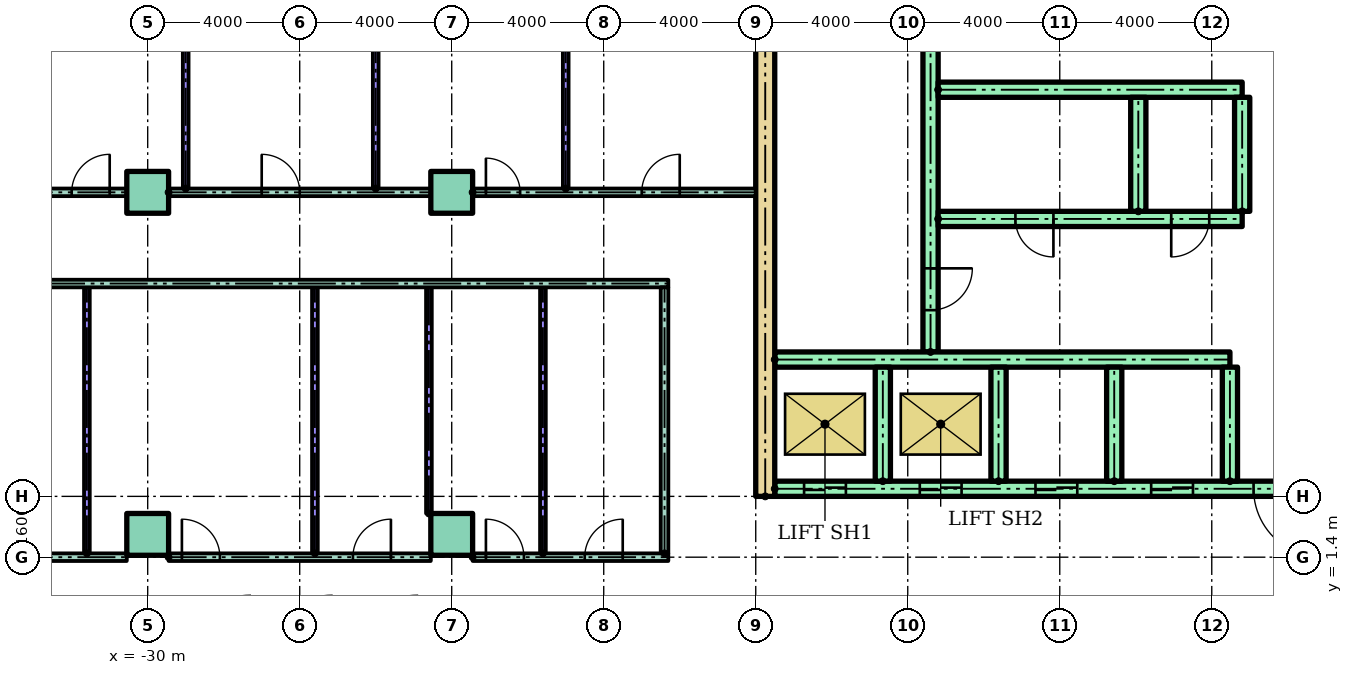
"""IFC4 building model, lengths in metres.
Left out: names, types, materials, properties, quantities, classifications, styles, units other than length and angle.
Written with IfcOpenShell. Run it as: python <this file> out.ifc"""

import sys

from ifc_helpers import new_model, si_unit, direction, frame, frame_2d, origin, origin_2d, place, context, subcontext, project, spatial, rectangle, extrude, element, fill, save


model = new_model("IFC4")
c1 = context("Model", 3, precision=1e-05, world=origin(), true_north=direction((0.0, 1.0)))
c2 = subcontext(c1, "Body", "Model", "MODEL_VIEW")
j1 = project(units=[si_unit("LENGTHUNIT", "METRE"), si_unit("PLANEANGLEUNIT", "RADIAN")], contexts=[c1])
p1 = place(None, origin())
s1 = spatial("IfcSite", under=j1, at=p1, CompositionType="ELEMENT")
p2 = place(p1, origin())
s2 = spatial("IfcBuilding", under=s1, at=p2, CompositionType="ELEMENT")
p3 = place(p2, origin())
s3 = spatial("IfcBuildingStorey", under=s2, at=p3, CompositionType="ELEMENT", Elevation=0.0)
for number, where in (
    (1, (-30.0, 2.0, 0.0)),
    (2, (-22.0, 2.0, 0.0)),
    (3, (-30.0, 11.0, 0.0)),
    (4, (-22.0, 11.0, 0.0)),
):
    element("IfcColumn", number, at=place(p3, frame(where)), inside=s3, PredefinedType="COLUMN", context=c2, shape_type="SweptSolid", body=[
        extrude(rectangle(XDim=1.1, YDim=1.1, at=origin_2d()), origin(), (0.0, 0.0, 1.0), 6.0),
    ])
p4 = place(p3, frame((-13.75, 3.0, 0.0), z_axis=(0.0, 0.0, 1.0), x_axis=(0.0, 1.0, 0.0)))
e5 = element("IfcWall", 5, at=p4, inside=s3, PredefinedType="SHEAR", context=c2, shape_type="SweptSolid", body=[
    extrude(rectangle(XDim=17.0, YDim=0.5, at=frame_2d((8.5, 0.0))), origin(), (0.0, 0.0, 1.0), 5.7),
])
p5 = place(p3, frame((-9.4, 6.8, 0.0), z_axis=(0.0, 0.0, 1.0), x_axis=(0.0, 1.0, 0.0)))
e6 = element("IfcWall", 6, at=p5, inside=s3, PredefinedType="SHEAR", context=c2, shape_type="SweptSolid", body=[
    extrude(rectangle(XDim=12.7, YDim=0.4, at=frame_2d((6.35, 0.0))), origin(), (0.0, 0.0, 1.0), 5.7),
])
p6 = place(p5, frame((1.1, 0.0, 0.0)))
e7 = element("IfcOpeningElement", 7, at=p6, cuts=e6, PredefinedType="OPENING", context=c2, shape_type="SweptSolid", body=[
    extrude(rectangle(XDim=1.1, YDim=2.1, at=frame_2d((0.55, 1.05))), frame((0.0, 0.21, 0.0), z_axis=(0.0, -1.0, 0.0), x_axis=(1.0, 0.0, 0.0)), (0.0, 0.0, 1.0), 0.42),
])
p7 = place(p3, frame((-13.5, 3.2, 0.0)))
e8 = element("IfcWall", 8, at=p7, inside=s3, PredefinedType="SHEAR", context=c2, shape_type="SweptSolid", body=[
    extrude(rectangle(XDim=27.0, YDim=0.4, at=frame_2d((13.5, 0.0))), origin(), (0.0, 0.0, 1.0), 5.7),
])
p8 = place(p7, frame((0.772, 0.0, 0.0)))
e9 = element("IfcOpeningElement", 9, at=p8, cuts=e8, PredefinedType="OPENING", context=c2, shape_type="SweptSolid", body=[
    extrude(rectangle(XDim=1.1, YDim=2.1, at=frame_2d((0.55, 1.05))), frame((0.0, 0.21, 0.0), z_axis=(0.0, -1.0, 0.0), x_axis=(1.0, 0.0, 0.0)), (0.0, 0.0, 1.0), 0.42),
])
p9 = place(p7, frame((3.817, 0.0, 0.0)))
e10 = element("IfcOpeningElement", 10, at=p9, cuts=e8, PredefinedType="OPENING", context=c2, shape_type="SweptSolid", body=[
    extrude(rectangle(XDim=1.1, YDim=2.1, at=frame_2d((0.55, 1.05))), frame((0.0, 0.21, 0.0), z_axis=(0.0, -1.0, 0.0), x_axis=(1.0, 0.0, 0.0)), (0.0, 0.0, 1.0), 0.42),
])
p10 = place(p7, frame((6.861, 0.0, 0.0)))
e11 = element("IfcOpeningElement", 11, at=p10, cuts=e8, PredefinedType="OPENING", context=c2, shape_type="SweptSolid", body=[
    extrude(rectangle(XDim=1.1, YDim=2.1, at=frame_2d((0.55, 1.05))), frame((0.0, 0.21, 0.0), z_axis=(0.0, -1.0, 0.0), x_axis=(1.0, 0.0, 0.0)), (0.0, 0.0, 1.0), 0.42),
])
p11 = place(p7, frame((9.906, 0.0, 0.0)))
e12 = element("IfcOpeningElement", 12, at=p11, cuts=e8, PredefinedType="OPENING", context=c2, shape_type="SweptSolid", body=[
    extrude(rectangle(XDim=1.1, YDim=2.1, at=frame_2d((0.55, 1.05))), frame((0.0, 0.21, 0.0), z_axis=(0.0, -1.0, 0.0), x_axis=(1.0, 0.0, 0.0)), (0.0, 0.0, 1.0), 0.42),
])
p12 = place(p7, frame((15.994, 0.0, 0.0)))
e13 = element("IfcOpeningElement", 13, at=p12, cuts=e8, PredefinedType="OPENING", context=c2, shape_type="SweptSolid", body=[
    extrude(rectangle(XDim=1.1, YDim=2.1, at=frame_2d((0.55, 1.05))), frame((0.0, 0.21, 0.0), z_axis=(0.0, -1.0, 0.0), x_axis=(1.0, 0.0, 0.0)), (0.0, 0.0, 1.0), 0.42),
])
p13 = place(p7, frame((19.039, 0.0, 0.0)))
e14 = element("IfcOpeningElement", 14, at=p13, cuts=e8, PredefinedType="OPENING", context=c2, shape_type="SweptSolid", body=[
    extrude(rectangle(XDim=1.1, YDim=2.1, at=frame_2d((0.55, 1.05))), frame((0.0, 0.21, 0.0), z_axis=(0.0, -1.0, 0.0), x_axis=(1.0, 0.0, 0.0)), (0.0, 0.0, 1.0), 0.42),
])
p14 = place(p7, frame((12.6, 0.0, 0.0)))
e15 = element("IfcOpeningElement", 15, at=p14, cuts=e8, PredefinedType="OPENING", context=c2, shape_type="SweptSolid", body=[
    extrude(rectangle(XDim=1.8, YDim=2.1, at=frame_2d((0.9, 1.05))), frame((0.0, 0.21, 0.0), z_axis=(0.0, -1.0, 0.0), x_axis=(1.0, 0.0, 0.0)), (0.0, 0.0, 1.0), 0.42),
])
p15 = place(p3, frame((-13.5, 6.6, 0.0)))
e16 = element("IfcWall", 16, at=p15, inside=s3, PredefinedType="SHEAR", context=c2, shape_type="SweptSolid", body=[
    extrude(rectangle(XDim=11.978, YDim=0.4, at=frame_2d((5.989, 0.0))), origin(), (0.0, 0.0, 1.0), 5.7),
])
for number, where, z_axis, x_axis in (
    (17, (-10.656, 3.4, 0.0), (0.0, 0.0, 1.0), (0.0, 1.0, 0.0)),
    (18, (-7.611, 3.4, 0.0), (0.0, 0.0, 1.0), (0.0, 1.0, 0.0)),
    (19, (-4.567, 3.4, 0.0), (0.0, 0.0, 1.0), (0.0, 1.0, 0.0)),
    (20, (-1.522, 3.4, 0.0), (0.0, 0.0, 1.0), (0.0, 1.0, 0.0)),
):
    element("IfcWall", number, at=place(p3, frame(where, z_axis=z_axis, x_axis=x_axis)), inside=s3, PredefinedType="SHEAR", context=c2, shape_type="SweptSolid", body=[
        extrude(rectangle(XDim=3.0, YDim=0.4, at=frame_2d((1.5, 0.0))), origin(), (0.0, 0.0, 1.0), 5.7),
    ])
p16 = place(p3, frame((-9.2, 10.3, 0.0)))
e21 = element("IfcWall", 21, at=p16, inside=s3, PredefinedType="SHEAR", context=c2, shape_type="SweptSolid", body=[
    extrude(rectangle(XDim=8.0, YDim=0.4, at=frame_2d((4.0, 0.0))), origin(), (0.0, 0.0, 1.0), 5.7),
])
p17 = place(p16, frame((2.033, 0.0, 0.0)))
e22 = element("IfcOpeningElement", 22, at=p17, cuts=e21, PredefinedType="OPENING", context=c2, shape_type="SweptSolid", body=[
    extrude(rectangle(XDim=1.0, YDim=2.1, at=frame_2d((0.5, 1.05))), frame((0.0, 0.21, 0.0), z_axis=(0.0, -1.0, 0.0), x_axis=(1.0, 0.0, 0.0)), (0.0, 0.0, 1.0), 0.42),
])
p18 = place(p16, frame((6.133, 0.0, 0.0)))
e23 = element("IfcOpeningElement", 23, at=p18, cuts=e21, PredefinedType="OPENING", context=c2, shape_type="SweptSolid", body=[
    extrude(rectangle(XDim=1.0, YDim=2.1, at=frame_2d((0.5, 1.05))), frame((0.0, 0.21, 0.0), z_axis=(0.0, -1.0, 0.0), x_axis=(1.0, 0.0, 0.0)), (0.0, 0.0, 1.0), 0.42),
])
p19 = place(p3, frame((-9.2, 13.7, 0.0)))
e24 = element("IfcWall", 24, at=p19, inside=s3, PredefinedType="SHEAR", context=c2, shape_type="SweptSolid", body=[
    extrude(rectangle(XDim=8.0, YDim=0.4, at=frame_2d((4.0, 0.0))), origin(), (0.0, 0.0, 1.0), 5.7),
])
for number, where, z_axis, x_axis in (
    (25, (-3.933, 10.5, 0.0), (0.0, 0.0, 1.0), (0.0, 1.0, 0.0)),
    (26, (-1.2, 10.5, 0.0), (0.0, 0.0, 1.0), (0.0, 1.0, 0.0)),
):
    element("IfcWall", number, at=place(p3, frame(where, z_axis=z_axis, x_axis=x_axis)), inside=s3, PredefinedType="SHEAR", context=c2, shape_type="SweptSolid", body=[
        extrude(rectangle(XDim=3.0, YDim=0.4, at=frame_2d((1.5, 0.0))), origin(), (0.0, 0.0, 1.0), 5.7),
    ])
p20 = place(p3, frame((-36.8, 1.4, 0.0)))
e27 = element("IfcWall", 27, at=p20, inside=s3, PredefinedType="PARTITIONING", context=c2, shape_type="SweptSolid", body=[
    extrude(rectangle(XDim=6.25, YDim=0.2, at=frame_2d((3.125, 0.0))), origin(), (0.0, 0.0, 1.0), 5.7),
])
p21 = place(p3, frame((-29.45, 1.4, 0.0)))
e28 = element("IfcWall", 28, at=p21, inside=s3, PredefinedType="PARTITIONING", context=c2, shape_type="SweptSolid", body=[
    extrude(rectangle(XDim=6.9, YDim=0.2, at=frame_2d((3.45, 0.0))), origin(), (0.0, 0.0, 1.0), 5.7),
])
p22 = place(p21, frame((0.35, 0.0, 0.0)))
e29 = element("IfcOpeningElement", 29, at=p22, cuts=e28, PredefinedType="OPENING", context=c2, shape_type="SweptSolid", body=[
    extrude(rectangle(XDim=1.0, YDim=2.1, at=frame_2d((0.5, 1.05))), frame((0.0, 0.11, 0.0), z_axis=(0.0, -1.0, 0.0), x_axis=(1.0, 0.0, 0.0)), (0.0, 0.0, 1.0), 0.22),
])
p23 = place(p21, frame((4.85, 0.0, 0.0)))
e30 = element("IfcOpeningElement", 30, at=p23, cuts=e28, PredefinedType="OPENING", context=c2, shape_type="SweptSolid", body=[
    extrude(rectangle(XDim=1.0, YDim=2.1, at=frame_2d((0.5, 1.05))), frame((0.0, 0.11, 0.0), z_axis=(0.0, -1.0, 0.0), x_axis=(1.0, 0.0, 0.0)), (0.0, 0.0, 1.0), 0.22),
])
p24 = place(p3, frame((-21.45, 1.4, 0.0)))
e31 = element("IfcWall", 31, at=p24, inside=s3, PredefinedType="PARTITIONING", context=c2, shape_type="SweptSolid", body=[
    extrude(rectangle(XDim=5.15, YDim=0.2, at=frame_2d((2.575, 0.0))), origin(), (0.0, 0.0, 1.0), 5.7),
])
p25 = place(p24, frame((0.35, 0.0, 0.0)))
e32 = element("IfcOpeningElement", 32, at=p25, cuts=e31, PredefinedType="OPENING", context=c2, shape_type="SweptSolid", body=[
    extrude(rectangle(XDim=1.0, YDim=2.1, at=frame_2d((0.5, 1.05))), frame((0.0, 0.11, 0.0), z_axis=(0.0, -1.0, 0.0), x_axis=(1.0, 0.0, 0.0)), (0.0, 0.0, 1.0), 0.22),
])
p26 = place(p24, frame((2.95, 0.0, 0.0)))
e33 = element("IfcOpeningElement", 33, at=p26, cuts=e31, PredefinedType="OPENING", context=c2, shape_type="SweptSolid", body=[
    extrude(rectangle(XDim=1.0, YDim=2.1, at=frame_2d((0.5, 1.05))), frame((0.0, 0.11, 0.0), z_axis=(0.0, -1.0, 0.0), x_axis=(1.0, 0.0, 0.0)), (0.0, 0.0, 1.0), 0.22),
])
p27 = place(p3, frame((-37.6, 8.6, 0.0)))
e34 = element("IfcWall", 34, at=p27, inside=s3, PredefinedType="PARTITIONING", context=c2, shape_type="SweptSolid", body=[
    extrude(rectangle(XDim=21.3, YDim=0.2, at=frame_2d((10.65, 0.0))), origin(), (0.0, 0.0, 1.0), 5.7),
])
p28 = place(p3, frame((-36.8, 11.0, 0.0)))
e35 = element("IfcWall", 35, at=p28, inside=s3, PredefinedType="PARTITIONING", context=c2, shape_type="SweptSolid", body=[
    extrude(rectangle(XDim=6.25, YDim=0.2, at=frame_2d((3.125, 0.0))), origin(), (0.0, 0.0, 1.0), 5.7),
])
p29 = place(p28, frame((0.5, 0.0, 0.0)))
e36 = element("IfcOpeningElement", 36, at=p29, cuts=e35, PredefinedType="OPENING", context=c2, shape_type="SweptSolid", body=[
    extrude(rectangle(XDim=1.0, YDim=2.1, at=frame_2d((0.5, 1.05))), frame((0.0, 0.11, 0.0), z_axis=(0.0, -1.0, 0.0), x_axis=(1.0, 0.0, 0.0)), (0.0, 0.0, 1.0), 0.22),
])
p30 = place(p28, frame((4.8, 0.0, 0.0)))
e37 = element("IfcOpeningElement", 37, at=p30, cuts=e35, PredefinedType="OPENING", context=c2, shape_type="SweptSolid", body=[
    extrude(rectangle(XDim=1.0, YDim=2.1, at=frame_2d((0.5, 1.05))), frame((0.0, 0.11, 0.0), z_axis=(0.0, -1.0, 0.0), x_axis=(1.0, 0.0, 0.0)), (0.0, 0.0, 1.0), 0.22),
])
p31 = place(p3, frame((-29.45, 11.0, 0.0)))
e38 = element("IfcWall", 38, at=p31, inside=s3, PredefinedType="PARTITIONING", context=c2, shape_type="SweptSolid", body=[
    extrude(rectangle(XDim=6.9, YDim=0.2, at=frame_2d((3.45, 0.0))), origin(), (0.0, 0.0, 1.0), 5.7),
])
p32 = place(p31, frame((2.45, 0.0, 0.0)))
e39 = element("IfcOpeningElement", 39, at=p32, cuts=e38, PredefinedType="OPENING", context=c2, shape_type="SweptSolid", body=[
    extrude(rectangle(XDim=1.0, YDim=2.1, at=frame_2d((0.5, 1.05))), frame((0.0, 0.11, 0.0), z_axis=(0.0, -1.0, 0.0), x_axis=(1.0, 0.0, 0.0)), (0.0, 0.0, 1.0), 0.22),
])
p33 = place(p3, frame((-21.45, 11.0, 0.0)))
e40 = element("IfcWall", 40, at=p33, inside=s3, PredefinedType="PARTITIONING", context=c2, shape_type="SweptSolid", body=[
    extrude(rectangle(XDim=7.45, YDim=0.2, at=frame_2d((3.725, 0.0))), origin(), (0.0, 0.0, 1.0), 5.7),
])
p34 = place(p33, frame((0.35, 0.0, 0.0)))
e41 = element("IfcOpeningElement", 41, at=p34, cuts=e40, PredefinedType="OPENING", context=c2, shape_type="SweptSolid", body=[
    extrude(rectangle(XDim=0.9, YDim=2.1, at=frame_2d((0.45, 1.05))), frame((0.0, 0.11, 0.0), z_axis=(0.0, -1.0, 0.0), x_axis=(1.0, 0.0, 0.0)), (0.0, 0.0, 1.0), 0.22),
])
p35 = place(p33, frame((4.45, 0.0, 0.0)))
e42 = element("IfcOpeningElement", 42, at=p35, cuts=e40, PredefinedType="OPENING", context=c2, shape_type="SweptSolid", body=[
    extrude(rectangle(XDim=1.0, YDim=2.1, at=frame_2d((0.5, 1.05))), frame((0.0, 0.11, 0.0), z_axis=(0.0, -1.0, 0.0), x_axis=(1.0, 0.0, 0.0)), (0.0, 0.0, 1.0), 0.22),
])
p36 = place(p3, frame((-31.6, 1.5, 0.0), z_axis=(0.0, 0.0, 1.0), x_axis=(0.0, 1.0, 0.0)))
e43 = element("IfcWall", 43, at=p36, inside=s3, PredefinedType="PARTITIONING", context=c2, shape_type="SweptSolid", body=[
    extrude(rectangle(XDim=7.0, YDim=0.15, at=frame_2d((3.5, 0.0))), origin(), (0.0, 0.0, 1.0), 5.7),
])
p37 = place(p3, frame((-29.0, 11.1, 0.0), z_axis=(0.0, 0.0, 1.0), x_axis=(0.0, 1.0, 0.0)))
e44 = element("IfcWall", 44, at=p37, inside=s3, PredefinedType="PARTITIONING", context=c2, shape_type="SweptSolid", body=[
    extrude(rectangle(XDim=8.5, YDim=0.15, at=frame_2d((4.25, 0.0))), origin(), (0.0, 0.0, 1.0), 5.7),
])
p38 = place(p3, frame((-25.6, 1.5, 0.0), z_axis=(0.0, 0.0, 1.0), x_axis=(0.0, 1.0, 0.0)))
e45 = element("IfcWall", 45, at=p38, inside=s3, PredefinedType="PARTITIONING", context=c2, shape_type="SweptSolid", body=[
    extrude(rectangle(XDim=7.0, YDim=0.15, at=frame_2d((3.5, 0.0))), origin(), (0.0, 0.0, 1.0), 5.7),
])
p39 = place(p3, frame((-24.0, 11.1, 0.0), z_axis=(0.0, 0.0, 1.0), x_axis=(0.0, 1.0, 0.0)))
e46 = element("IfcWall", 46, at=p39, inside=s3, PredefinedType="PARTITIONING", context=c2, shape_type="SweptSolid", body=[
    extrude(rectangle(XDim=8.5, YDim=0.15, at=frame_2d((4.25, 0.0))), origin(), (0.0, 0.0, 1.0), 5.7),
])
p40 = place(p3, frame((-22.6, 2.55, 0.0), z_axis=(0.0, 0.0, 1.0), x_axis=(0.0, 1.0, 0.0)))
e47 = element("IfcWall", 47, at=p40, inside=s3, PredefinedType="PARTITIONING", context=c2, shape_type="SweptSolid", body=[
    extrude(rectangle(XDim=5.95, YDim=0.15, at=frame_2d((2.975, 0.0))), origin(), (0.0, 0.0, 1.0), 5.7),
])
p41 = place(p3, frame((-19.6, 1.5, 0.0), z_axis=(0.0, 0.0, 1.0), x_axis=(0.0, 1.0, 0.0)))
e48 = element("IfcWall", 48, at=p41, inside=s3, PredefinedType="PARTITIONING", context=c2, shape_type="SweptSolid", body=[
    extrude(rectangle(XDim=7.0, YDim=0.15, at=frame_2d((3.5, 0.0))), origin(), (0.0, 0.0, 1.0), 5.7),
])
p42 = place(p3, frame((-19.0, 11.1, 0.0), z_axis=(0.0, 0.0, 1.0), x_axis=(0.0, 1.0, 0.0)))
e49 = element("IfcWall", 49, at=p42, inside=s3, PredefinedType="PARTITIONING", context=c2, shape_type="SweptSolid", body=[
    extrude(rectangle(XDim=8.5, YDim=0.15, at=frame_2d((4.25, 0.0))), origin(), (0.0, 0.0, 1.0), 5.7),
])
p43 = place(p3, frame((-16.4, 1.5, 0.0), z_axis=(0.0, 0.0, 1.0), x_axis=(0.0, 1.0, 0.0)))
e50 = element("IfcWall", 50, at=p43, inside=s3, PredefinedType="PARTITIONING", context=c2, shape_type="SweptSolid", body=[
    extrude(rectangle(XDim=7.0, YDim=0.2, at=frame_2d((3.5, 0.0))), origin(), (0.0, 0.0, 1.0), 5.7),
])
p44 = place(p8, origin())
e51 = element("IfcDoor", 51, at=p44, inside=s3, OperationType="SLIDING_TO_LEFT", PredefinedType="DOOR", context=c2, shape_type="SweptSolid", body=[
    extrude(rectangle(XDim=1.1, YDim=2.1, at=frame_2d((0.55, 1.05))), frame((0.0, 0.025, 0.0), z_axis=(0.0, -1.0, 0.0), x_axis=(1.0, 0.0, 0.0)), (0.0, 0.0, 1.0), 0.05),
])
fill(e9, e51)
p45 = place(p9, origin())
e52 = element("IfcDoor", 52, at=p45, inside=s3, OperationType="SLIDING_TO_LEFT", PredefinedType="DOOR", context=c2, shape_type="SweptSolid", body=[
    extrude(rectangle(XDim=1.1, YDim=2.1, at=frame_2d((0.55, 1.05))), frame((0.0, 0.025, 0.0), z_axis=(0.0, -1.0, 0.0), x_axis=(1.0, 0.0, 0.0)), (0.0, 0.0, 1.0), 0.05),
])
fill(e10, e52)
p46 = place(p10, origin())
e53 = element("IfcDoor", 53, at=p46, inside=s3, OperationType="SLIDING_TO_LEFT", PredefinedType="DOOR", context=c2, shape_type="SweptSolid", body=[
    extrude(rectangle(XDim=1.1, YDim=2.1, at=frame_2d((0.55, 1.05))), frame((0.0, 0.025, 0.0), z_axis=(0.0, -1.0, 0.0), x_axis=(1.0, 0.0, 0.0)), (0.0, 0.0, 1.0), 0.05),
])
fill(e11, e53)
p47 = place(p11, origin())
e54 = element("IfcDoor", 54, at=p47, inside=s3, OperationType="SLIDING_TO_LEFT", PredefinedType="DOOR", context=c2, shape_type="SweptSolid", body=[
    extrude(rectangle(XDim=1.1, YDim=2.1, at=frame_2d((0.55, 1.05))), frame((0.0, 0.025, 0.0), z_axis=(0.0, -1.0, 0.0), x_axis=(1.0, 0.0, 0.0)), (0.0, 0.0, 1.0), 0.05),
])
fill(e12, e54)
p48 = place(p14, frame((1.8, 0.0, 0.0), z_axis=(0.0, 0.0, 1.0), x_axis=(-1.0, 0.0, 0.0)))
e55 = element("IfcDoor", 55, at=p48, inside=s3, OperationType="DOUBLE_DOOR_SINGLE_SWING", PredefinedType="DOOR", context=c2, shape_type="SweptSolid", body=[
    extrude(rectangle(XDim=1.8, YDim=2.1, at=frame_2d((0.9, 1.05))), frame((0.0, 0.025, 0.0), z_axis=(0.0, -1.0, 0.0), x_axis=(1.0, 0.0, 0.0)), (0.0, 0.0, 1.0), 0.05),
])
fill(e15, e55)
p49 = place(p17, frame((1.0, 0.0, 0.0), z_axis=(0.0, 0.0, 1.0), x_axis=(-1.0, 0.0, 0.0)))
e56 = element("IfcDoor", 56, at=p49, inside=s3, OperationType="SINGLE_SWING_RIGHT", PredefinedType="DOOR", context=c2, shape_type="SweptSolid", body=[
    extrude(rectangle(XDim=1.0, YDim=2.1, at=frame_2d((0.5, 1.05))), frame((0.0, 0.025, 0.0), z_axis=(0.0, -1.0, 0.0), x_axis=(1.0, 0.0, 0.0)), (0.0, 0.0, 1.0), 0.05),
])
fill(e22, e56)
p50 = place(p18, frame((1.0, 0.0, 0.0), z_axis=(0.0, 0.0, 1.0), x_axis=(-1.0, 0.0, 0.0)))
e57 = element("IfcDoor", 57, at=p50, inside=s3, OperationType="SINGLE_SWING_LEFT", PredefinedType="DOOR", context=c2, shape_type="SweptSolid", body=[
    extrude(rectangle(XDim=1.0, YDim=2.1, at=frame_2d((0.5, 1.05))), frame((0.0, 0.025, 0.0), z_axis=(0.0, -1.0, 0.0), x_axis=(1.0, 0.0, 0.0)), (0.0, 0.0, 1.0), 0.05),
])
fill(e23, e57)
p51 = place(p6, frame((1.1, 0.0, 0.0), z_axis=(0.0, 0.0, 1.0), x_axis=(-1.0, 0.0, 0.0)))
e58 = element("IfcDoor", 58, at=p51, inside=s3, OperationType="SINGLE_SWING_RIGHT", PredefinedType="DOOR", context=c2, shape_type="SweptSolid", body=[
    extrude(rectangle(XDim=1.1, YDim=2.1, at=frame_2d((0.55, 1.05))), frame((0.0, 0.025, 0.0), z_axis=(0.0, -1.0, 0.0), x_axis=(1.0, 0.0, 0.0)), (0.0, 0.0, 1.0), 0.05),
])
fill(e7, e58)
p52 = place(p22, origin())
e59 = element("IfcDoor", 59, at=p52, inside=s3, OperationType="SINGLE_SWING_LEFT", PredefinedType="DOOR", context=c2, shape_type="SweptSolid", body=[
    extrude(rectangle(XDim=1.0, YDim=2.1, at=frame_2d((0.5, 1.05))), frame((0.0, 0.025, 0.0), z_axis=(0.0, -1.0, 0.0), x_axis=(1.0, 0.0, 0.0)), (0.0, 0.0, 1.0), 0.05),
])
fill(e29, e59)
p53 = place(p23, origin())
e60 = element("IfcDoor", 60, at=p53, inside=s3, OperationType="SINGLE_SWING_RIGHT", PredefinedType="DOOR", context=c2, shape_type="SweptSolid", body=[
    extrude(rectangle(XDim=1.0, YDim=2.1, at=frame_2d((0.5, 1.05))), frame((0.0, 0.025, 0.0), z_axis=(0.0, -1.0, 0.0), x_axis=(1.0, 0.0, 0.0)), (0.0, 0.0, 1.0), 0.05),
])
fill(e30, e60)
p54 = place(p25, origin())
e61 = element("IfcDoor", 61, at=p54, inside=s3, OperationType="SINGLE_SWING_LEFT", PredefinedType="DOOR", context=c2, shape_type="SweptSolid", body=[
    extrude(rectangle(XDim=1.0, YDim=2.1, at=frame_2d((0.5, 1.05))), frame((0.0, 0.025, 0.0), z_axis=(0.0, -1.0, 0.0), x_axis=(1.0, 0.0, 0.0)), (0.0, 0.0, 1.0), 0.05),
])
fill(e32, e61)
p55 = place(p26, origin())
e62 = element("IfcDoor", 62, at=p55, inside=s3, OperationType="SINGLE_SWING_RIGHT", PredefinedType="DOOR", context=c2, shape_type="SweptSolid", body=[
    extrude(rectangle(XDim=1.0, YDim=2.1, at=frame_2d((0.5, 1.05))), frame((0.0, 0.025, 0.0), z_axis=(0.0, -1.0, 0.0), x_axis=(1.0, 0.0, 0.0)), (0.0, 0.0, 1.0), 0.05),
])
fill(e33, e62)
p56 = place(p30, origin())
e63 = element("IfcDoor", 63, at=p56, inside=s3, OperationType="SINGLE_SWING_RIGHT", PredefinedType="DOOR", context=c2, shape_type="SweptSolid", body=[
    extrude(rectangle(XDim=1.0, YDim=2.1, at=frame_2d((0.5, 1.05))), frame((0.0, 0.025, 0.0), z_axis=(0.0, -1.0, 0.0), x_axis=(1.0, 0.0, 0.0)), (0.0, 0.0, 1.0), 0.05),
])
fill(e37, e63)
p57 = place(p32, origin())
e64 = element("IfcDoor", 64, at=p57, inside=s3, OperationType="SINGLE_SWING_LEFT", PredefinedType="DOOR", context=c2, shape_type="SweptSolid", body=[
    extrude(rectangle(XDim=1.0, YDim=2.1, at=frame_2d((0.5, 1.05))), frame((0.0, 0.025, 0.0), z_axis=(0.0, -1.0, 0.0), x_axis=(1.0, 0.0, 0.0)), (0.0, 0.0, 1.0), 0.05),
])
fill(e39, e64)
p58 = place(p34, origin())
e65 = element("IfcDoor", 65, at=p58, inside=s3, OperationType="SINGLE_SWING_LEFT", PredefinedType="DOOR", context=c2, shape_type="SweptSolid", body=[
    extrude(rectangle(XDim=0.9, YDim=2.1, at=frame_2d((0.45, 1.05))), frame((0.0, 0.025, 0.0), z_axis=(0.0, -1.0, 0.0), x_axis=(1.0, 0.0, 0.0)), (0.0, 0.0, 1.0), 0.05),
])
fill(e41, e65)
p59 = place(p35, origin())
e66 = element("IfcDoor", 66, at=p59, inside=s3, OperationType="SINGLE_SWING_RIGHT", PredefinedType="DOOR", context=c2, shape_type="SweptSolid", body=[
    extrude(rectangle(XDim=1.0, YDim=2.1, at=frame_2d((0.5, 1.05))), frame((0.0, 0.025, 0.0), z_axis=(0.0, -1.0, 0.0), x_axis=(1.0, 0.0, 0.0)), (0.0, 0.0, 1.0), 0.05),
])
fill(e42, e66)
save(model, sys.argv[1])
